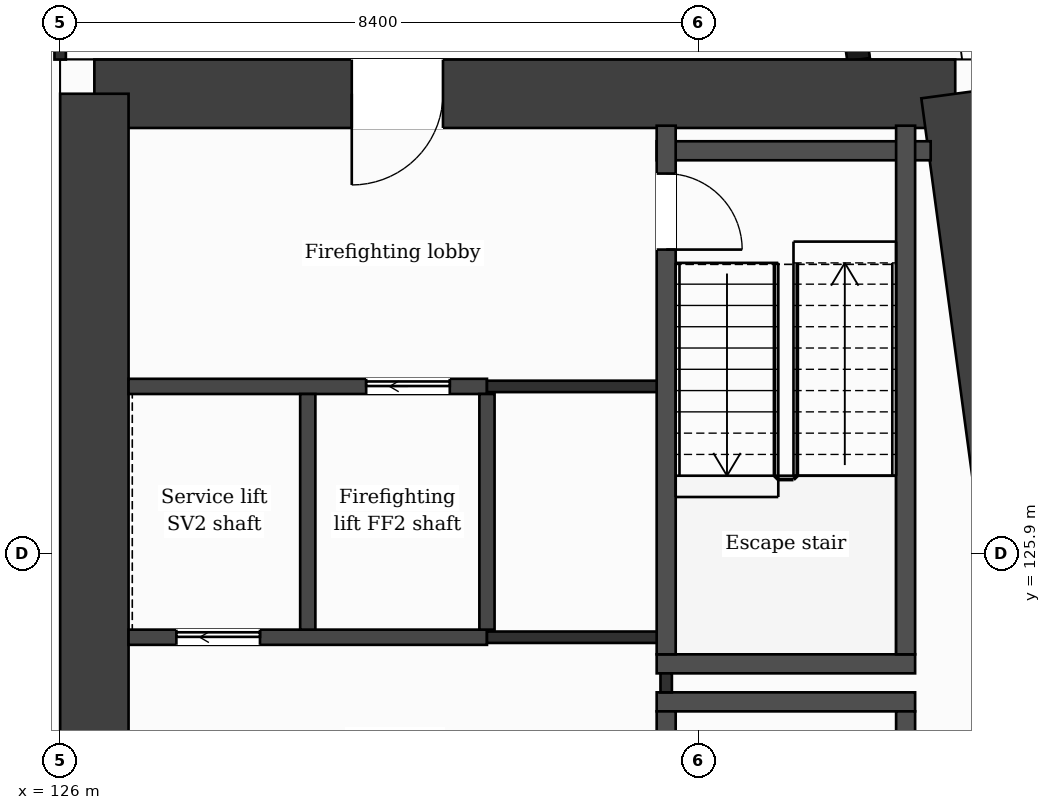
"""IFC4 building model, lengths in metres.
Left out: names, types, materials, properties, quantities, classifications, styles, units other than length and angle.
Written with IfcOpenShell. Run it as: python <this file> out.ifc"""

import sys

from ifc_helpers import new_model, si_unit, direction, frame, frame_2d, origin, place, context, subcontext, project, spatial, rectangle, extrude, element, fill, save


model = new_model("IFC4")
c1 = context("Model", 3, precision=1e-05, world=origin(), true_north=direction((0.0, 1.0)))
c2 = subcontext(c1, "Body", "Model", "MODEL_VIEW")
j1 = project(units=[si_unit("LENGTHUNIT", "METRE"), si_unit("PLANEANGLEUNIT", "RADIAN")], contexts=[c1])
p1 = place(None, origin())
s1 = spatial("IfcSite", under=j1, at=p1, CompositionType="ELEMENT")
p2 = place(p1, origin())
s2 = spatial("IfcBuilding", under=s1, at=p2, CompositionType="ELEMENT")
p3 = place(p2, frame((0.0, 0.0, 162.6)))
s3 = spatial("IfcBuildingStorey", under=s2, at=p3, CompositionType="ELEMENT", Elevation=162.6)
p4 = place(p3, frame((126.45, 131.95, 0.0), z_axis=(0.0, 0.0, 1.0), x_axis=(1.0, 0.0, 0.0)))
e1 = element("IfcWall", 1, at=p4, inside=s3, PredefinedType="SHEAR", context=c2, shape_type="SweptSolid", body=[
    extrude(rectangle(XDim=11.326, YDim=0.9, at=frame_2d((5.663, 0.0))), origin(), (0.0, 0.0, 1.0), 3.7),
])
p5 = place(p4, frame((3.386, 0.0, 0.0)))
e2 = element("IfcOpeningElement", 2, at=p5, cuts=e1, PredefinedType="OPENING", context=c2, shape_type="SweptSolid", body=[
    extrude(rectangle(XDim=1.2, YDim=2.1, at=frame_2d((0.6, 1.05))), frame((0.0, 0.46, 0.0), z_axis=(0.0, -1.0, 0.0), x_axis=(1.0, 0.0, 0.0)), (0.0, 0.0, 1.0), 0.92),
])
p6 = place(p3, frame((137.776, 131.95, 0.0), z_axis=(0.0, 0.0, 1.0), x_axis=(0.133421759112, -0.991059349482, 0.0)))
e3 = element("IfcWall", 3, at=p6, inside=s3, PredefinedType="SHEAR", context=c2, shape_type="SweptSolid", body=[
    extrude(rectangle(XDim=21.29, YDim=0.9, at=frame_2d((10.645, 0.0))), origin(), (0.0, 0.0, 1.0), 3.7),
])
p7 = place(p3, frame((126.45, 110.85, 0.0), z_axis=(0.0, 0.0, 1.0), x_axis=(0.0, 1.0, 0.0)))
e4 = element("IfcWall", 4, at=p7, inside=s3, PredefinedType="SHEAR", context=c2, shape_type="SweptSolid", body=[
    extrude(rectangle(XDim=21.1, YDim=0.9, at=frame_2d((10.55, 0.0))), origin(), (0.0, 0.0, 1.0), 3.7),
])
p8 = place(p3, frame((136.504, 132.4, 0.0), z_axis=(0.0, 0.0, 1.0), x_axis=(-0.133399697462, 0.99106231929, 0.0)))
e5 = element("IfcWall", 5, at=p8, inside=s3, PredefinedType="SOLIDWALL", context=c2, shape_type="SweptSolid", body=[
    extrude(rectangle(XDim=6.74, YDim=0.3, at=frame_2d((3.37, 0.0))), origin(), (0.0, 0.0, 1.0), 3.38),
])
p9 = place(p8, frame((1.115, 0.0, 0.0)))
e6 = element("IfcOpeningElement", 6, at=p9, cuts=e5, PredefinedType="OPENING", context=c2, shape_type="SweptSolid", body=[
    extrude(rectangle(XDim=1.2, YDim=2.4, at=frame_2d((0.6, 1.2))), frame((0.0, 0.16, 0.0), z_axis=(0.0, -1.0, 0.0), x_axis=(1.0, 0.0, 0.0)), (0.0, 0.0, 1.0), 0.32),
])
p10 = place(p8, frame((3.835, 0.0, 0.9)))
e7 = element("IfcOpeningElement", 7, at=p10, cuts=e5, PredefinedType="OPENING", context=c2, shape_type="SweptSolid", body=[
    extrude(rectangle(XDim=2.4, YDim=2.1, at=frame_2d((1.2, 1.05))), frame((0.0, 0.16, 0.0), z_axis=(0.0, -1.0, 0.0), x_axis=(1.0, 0.0, 0.0)), (0.0, 0.0, 1.0), 0.32),
])
for number, where, z_axis, x_axis in (
    (8, (133.848, 123.95, 0.0), (0.0, 0.0, 1.0), (1.0, 0.0, 0.0)),
    (9, (133.848, 124.45, 0.0), (0.0, 0.0, 1.0), (1.0, 0.0, 0.0)),
):
    element("IfcWall", number, at=place(p3, frame(where, z_axis=z_axis, x_axis=x_axis)), inside=s3, PredefinedType="PARTITIONING", context=c2, shape_type="SweptSolid", body=[
        extrude(rectangle(XDim=3.4, YDim=0.25, at=frame_2d((1.7, 0.0))), origin(), (0.0, 0.0, 1.0), 3.38),
    ])
p11 = place(p3, frame((126.9, 124.8, 0.0), z_axis=(0.0, 0.0, 1.0), x_axis=(1.0, 0.0, 0.0)))
e10 = element("IfcWall", 10, at=p11, inside=s3, PredefinedType="PARTITIONING", context=c2, shape_type="SweptSolid", body=[
    extrude(rectangle(XDim=4.715, YDim=0.2, at=frame_2d((2.358, 0.0))), origin(), (0.0, 0.0, 1.0), 3.38),
])
p12 = place(p11, frame((0.629, 0.0, 0.0)))
e11 = element("IfcOpeningElement", 11, at=p12, cuts=e10, PredefinedType="OPENING", context=c2, shape_type="SweptSolid", body=[
    extrude(rectangle(XDim=1.1, YDim=2.1, at=frame_2d((0.55, 1.05))), frame((0.0, 0.11, 0.0), z_axis=(0.0, -1.0, 0.0), x_axis=(1.0, 0.0, 0.0)), (0.0, 0.0, 1.0), 0.22),
])
p13 = place(p3, frame((131.615, 124.8, 0.0), z_axis=(0.0, 0.0, 1.0), x_axis=(1.0, 0.0, 0.0)))
e12 = element("IfcWall", 12, at=p13, inside=s3, PredefinedType="PARTITIONING", context=c2, shape_type="SweptSolid", body=[
    extrude(rectangle(XDim=2.483, YDim=0.15, at=frame_2d((1.241, 0.0))), origin(), (0.0, 0.0, 1.0), 3.38),
])
p14 = place(p3, frame((126.9, 128.1, 0.0), z_axis=(0.0, 0.0, 1.0), x_axis=(1.0, 0.0, 0.0)))
e13 = element("IfcWall", 13, at=p14, inside=s3, PredefinedType="PARTITIONING", context=c2, shape_type="SweptSolid", body=[
    extrude(rectangle(XDim=4.715, YDim=0.2, at=frame_2d((2.358, 0.0))), origin(), (0.0, 0.0, 1.0), 3.38),
])
p15 = place(p14, frame((3.126, 0.0, 0.0)))
e14 = element("IfcOpeningElement", 14, at=p15, cuts=e13, PredefinedType="OPENING", context=c2, shape_type="SweptSolid", body=[
    extrude(rectangle(XDim=1.1, YDim=2.1, at=frame_2d((0.55, 1.05))), frame((0.0, 0.11, 0.0), z_axis=(0.0, -1.0, 0.0), x_axis=(1.0, 0.0, 0.0)), (0.0, 0.0, 1.0), 0.22),
])
p16 = place(p3, frame((131.615, 128.1, 0.0), z_axis=(0.0, 0.0, 1.0), x_axis=(1.0, 0.0, 0.0)))
e15 = element("IfcWall", 15, at=p16, inside=s3, PredefinedType="PARTITIONING", context=c2, shape_type="SweptSolid", body=[
    extrude(rectangle(XDim=2.358, YDim=0.15, at=frame_2d((1.179, 0.0))), origin(), (0.0, 0.0, 1.0), 3.38),
])
p17 = place(p3, frame((133.848, 131.2, 0.0), z_axis=(0.0, 0.0, 1.0), x_axis=(1.0, 0.0, 0.0)))
e16 = element("IfcWall", 16, at=p17, inside=s3, PredefinedType="PARTITIONING", context=c2, shape_type="SweptSolid", body=[
    extrude(rectangle(XDim=3.605, YDim=0.25, at=frame_2d((1.802, 0.0))), origin(), (0.0, 0.0, 1.0), 3.38),
])
p18 = place(p3, frame((126.0, 132.4, 0.0), z_axis=(0.0, 0.0, 1.0), x_axis=(0.0, 1.0, 0.0)))
e17 = element("IfcWall", 17, at=p18, inside=s3, PredefinedType="PARTITIONING", context=c2, shape_type="SweptSolid", body=[
    extrude(rectangle(XDim=1.325, YDim=0.15, at=frame_2d((0.663, 0.0))), origin(), (0.0, 0.0, 1.0), 3.38),
])
for number, where, z_axis, x_axis in (
    (18, (129.258, 124.9, 0.0), (0.0, 0.0, 1.0), (0.0, 1.0, 0.0)),
    (19, (131.615, 124.9, 0.0), (0.0, 0.0, 1.0), (0.0, 1.0, 0.0)),
):
    element("IfcWall", number, at=place(p3, frame(where, z_axis=z_axis, x_axis=x_axis)), inside=s3, PredefinedType="PARTITIONING", context=c2, shape_type="SweptSolid", body=[
        extrude(rectangle(XDim=3.1, YDim=0.2, at=frame_2d((1.55, 0.0))), origin(), (0.0, 0.0, 1.0), 3.38),
    ])
p19 = place(p3, frame((133.973, 124.075, 0.0), z_axis=(0.0, 0.0, 1.0), x_axis=(0.0, 1.0, 0.0)))
e20 = element("IfcWall", 20, at=p19, inside=s3, PredefinedType="PARTITIONING", context=c2, shape_type="SweptSolid", body=[
    extrude(rectangle(XDim=0.25, YDim=0.15, at=frame_2d((0.125, 0.0))), origin(), (0.0, 0.0, 1.0), 3.38),
])
p20 = place(p3, frame((133.973, 116.87, 0.0), z_axis=(0.0, 0.0, 1.0), x_axis=(0.0, 1.0, 0.0)))
e21 = element("IfcWall", 21, at=p20, inside=s3, PredefinedType="PARTITIONING", context=c2, shape_type="SweptSolid", body=[
    extrude(rectangle(XDim=6.955, YDim=0.25, at=frame_2d((3.478, 0.0))), origin(), (0.0, 0.0, 1.0), 3.38),
])
p21 = place(p20, frame((5.655, 0.0, 0.0)))
e22 = element("IfcOpeningElement", 22, at=p21, cuts=e21, PredefinedType="OPENING", context=c2, shape_type="SweptSolid", body=[
    extrude(rectangle(XDim=0.95, YDim=2.1, at=frame_2d((0.475, 1.05))), frame((0.0, 0.135, 0.0), z_axis=(0.0, -1.0, 0.0), x_axis=(1.0, 0.0, 0.0)), (0.0, 0.0, 1.0), 0.27),
])
p22 = place(p3, frame((133.973, 124.575, 0.0), z_axis=(0.0, 0.0, 1.0), x_axis=(0.0, 1.0, 0.0)))
e23 = element("IfcWall", 23, at=p22, inside=s3, PredefinedType="PARTITIONING", context=c2, shape_type="SweptSolid", body=[
    extrude(rectangle(XDim=6.955, YDim=0.25, at=frame_2d((3.478, 0.0))), origin(), (0.0, 0.0, 1.0), 3.38),
])
p23 = place(p22, frame((5.325, 0.0, 0.0)))
e24 = element("IfcOpeningElement", 24, at=p23, cuts=e23, PredefinedType="OPENING", context=c2, shape_type="SweptSolid", body=[
    extrude(rectangle(XDim=1.0, YDim=2.1, at=frame_2d((0.5, 1.05))), frame((0.0, 0.135, 0.0), z_axis=(0.0, -1.0, 0.0), x_axis=(1.0, 0.0, 0.0)), (0.0, 0.0, 1.0), 0.27),
])
p24 = place(p3, frame((137.123, 116.87, 0.0), z_axis=(0.0, 0.0, 1.0), x_axis=(0.0, 1.0, 0.0)))
e25 = element("IfcWall", 25, at=p24, inside=s3, PredefinedType="PARTITIONING", context=c2, shape_type="SweptSolid", body=[
    extrude(rectangle(XDim=6.955, YDim=0.25, at=frame_2d((3.478, 0.0))), origin(), (0.0, 0.0, 1.0), 3.38),
])
p25 = place(p3, frame((137.123, 124.575, 0.0), z_axis=(0.0, 0.0, 1.0), x_axis=(0.0, 1.0, 0.0)))
e26 = element("IfcWall", 26, at=p25, inside=s3, PredefinedType="PARTITIONING", context=c2, shape_type="SweptSolid", body=[
    extrude(rectangle(XDim=6.955, YDim=0.25, at=frame_2d((3.478, 0.0))), origin(), (0.0, 0.0, 1.0), 3.38),
])
p26 = place(p15, origin())
e27 = element("IfcDoor", 27, at=p26, inside=s3, OperationType="SLIDING_TO_LEFT", PredefinedType="DOOR", context=c2, shape_type="SweptSolid", body=[
    extrude(rectangle(XDim=1.1, YDim=2.1, at=frame_2d((0.55, 1.05))), frame((0.0, 0.025, 0.0), z_axis=(0.0, -1.0, 0.0), x_axis=(1.0, 0.0, 0.0)), (0.0, 0.0, 1.0), 0.05),
])
fill(e14, e27)
p27 = place(p12, origin())
e28 = element("IfcDoor", 28, at=p27, inside=s3, OperationType="SLIDING_TO_LEFT", PredefinedType="DOOR", context=c2, shape_type="SweptSolid", body=[
    extrude(rectangle(XDim=1.1, YDim=2.1, at=frame_2d((0.55, 1.05))), frame((0.0, 0.025, 0.0), z_axis=(0.0, -1.0, 0.0), x_axis=(1.0, 0.0, 0.0)), (0.0, 0.0, 1.0), 0.05),
])
fill(e11, e28)
p28 = place(p23, origin())
e29 = element("IfcDoor", 29, at=p28, inside=s3, OperationType="SINGLE_SWING_LEFT", PredefinedType="DOOR", context=c2, shape_type="SweptSolid", body=[
    extrude(rectangle(XDim=1.0, YDim=2.1, at=frame_2d((0.5, 1.05))), frame((0.0, 0.025, 0.0), z_axis=(0.0, -1.0, 0.0), x_axis=(1.0, 0.0, 0.0)), (0.0, 0.0, 1.0), 0.05),
])
fill(e24, e29)
p29 = place(p5, origin())
e30 = element("IfcDoor", 30, at=p29, inside=s3, OperationType="SINGLE_SWING_LEFT", PredefinedType="DOOR", context=c2, shape_type="SweptSolid", body=[
    extrude(rectangle(XDim=1.2, YDim=2.1, at=frame_2d((0.6, 1.05))), frame((0.0, 0.025, 0.0), z_axis=(0.0, -1.0, 0.0), x_axis=(1.0, 0.0, 0.0)), (0.0, 0.0, 1.0), 0.05),
])
fill(e2, e30)
save(model, sys.argv[1])
